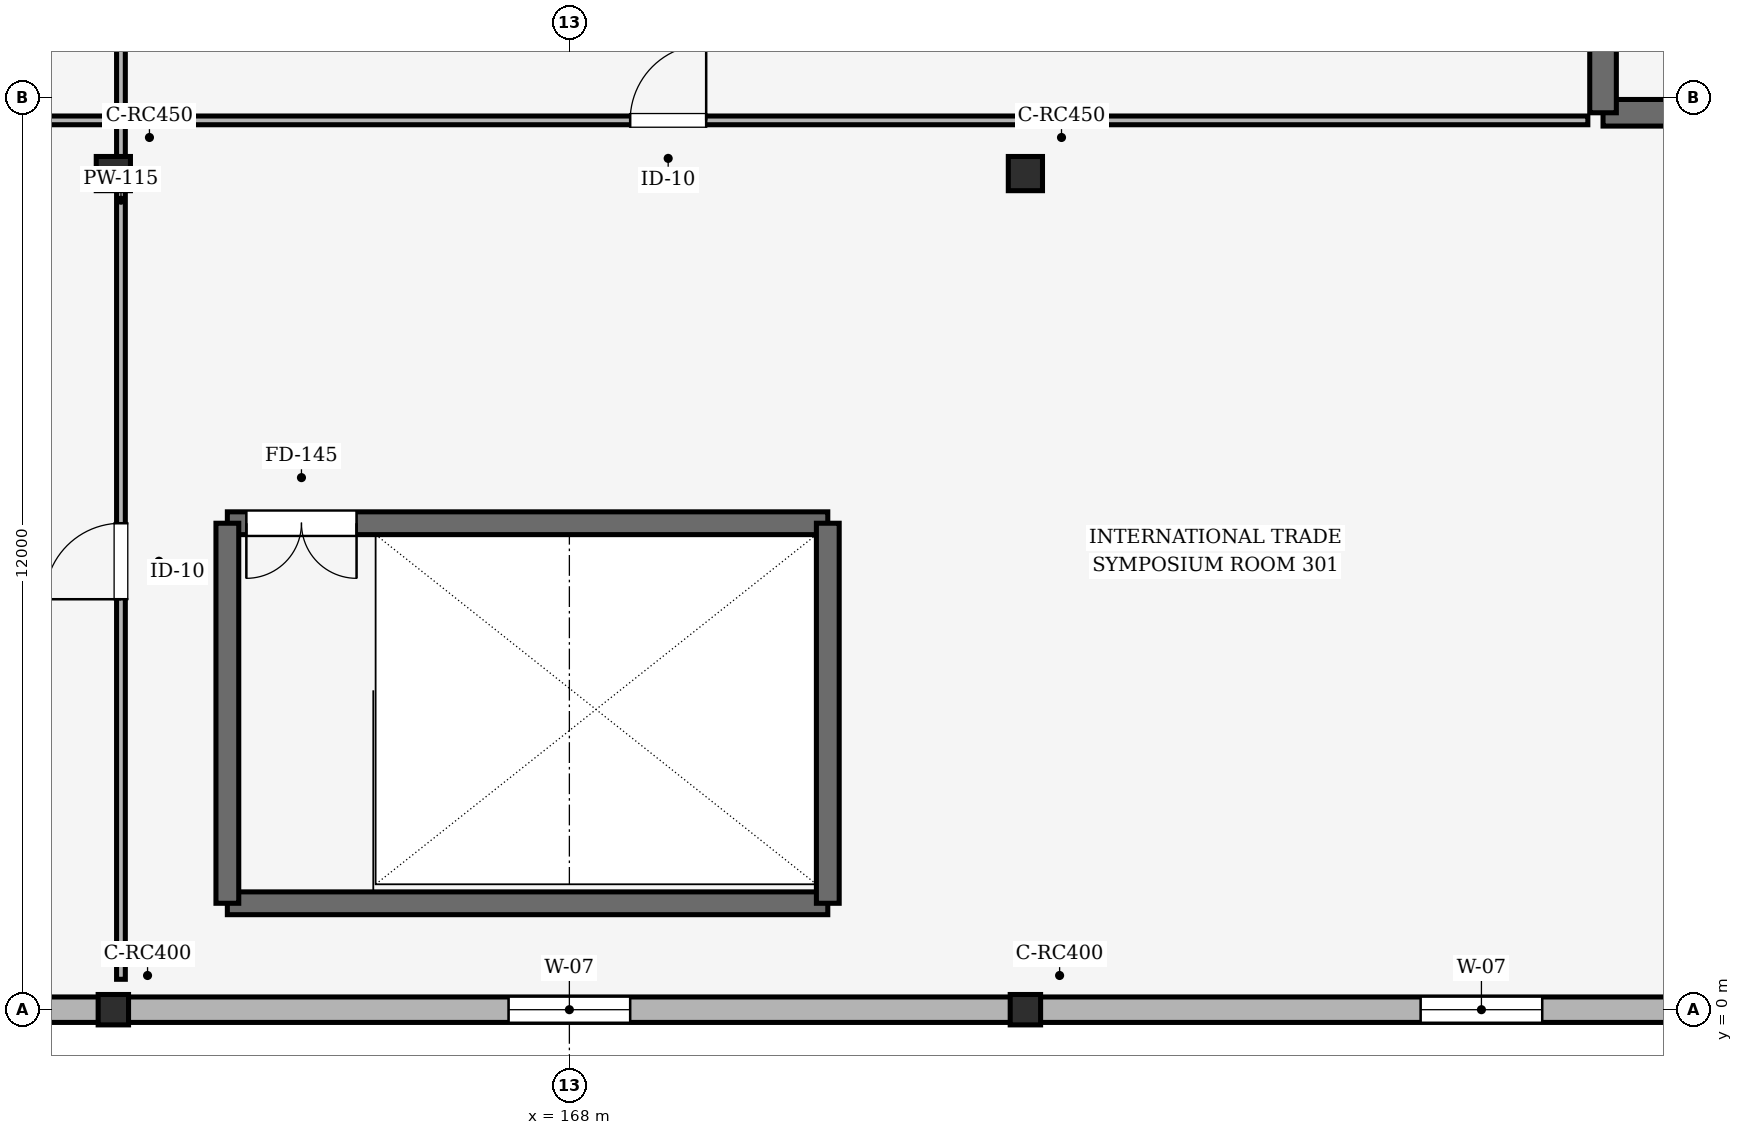
"""IFC4 building model, lengths in metres.
Left out: names, types, materials, properties, quantities, classifications, styles, units other than length and angle.
Written with IfcOpenShell. Run it as: python <this file> out.ifc"""

import sys

from ifc_helpers import new_model, si_unit, direction, frame, frame_2d, origin, origin_2d, place, context, subcontext, project, spatial, rectangle, extrude, element, fill, save


model = new_model("IFC4")
c1 = context("Model", 3, precision=1e-05, world=origin(), true_north=direction((0.0, 1.0)))
c2 = subcontext(c1, "Body", "Model", "MODEL_VIEW")
j1 = project(units=[si_unit("LENGTHUNIT", "METRE"), si_unit("PLANEANGLEUNIT", "RADIAN")], contexts=[c1])
p1 = place(None, origin())
s1 = spatial("IfcSite", under=j1, at=p1, CompositionType="ELEMENT")
p2 = place(p1, origin())
s2 = spatial("IfcBuilding", under=s1, at=p2, CompositionType="ELEMENT")
p3 = place(p2, frame((0.0, 0.0, 16.2)))
s3 = spatial("IfcBuildingStorey", under=s2, at=p3, CompositionType="ELEMENT", Elevation=16.2)
p4 = place(p3, frame((162.0, 0.0, 0.0), z_axis=(0.0, 0.0, 1.0), x_axis=(1.0, 0.0, 0.0)))
e1 = element("IfcColumn", 1, at=p4, inside=s3, PredefinedType="COLUMN", context=c2, shape_type="SweptSolid", body=[
    extrude(rectangle(XDim=0.4, YDim=0.4, at=origin_2d()), origin(), (0.0, 0.0, 1.0), 4.5),
])
p5 = place(p3, frame((162.0, 11.0, 0.0), z_axis=(0.0, 0.0, 1.0), x_axis=(1.0, 0.0, 0.0)))
e2 = element("IfcColumn", 2, at=p5, inside=s3, PredefinedType="COLUMN", context=c2, shape_type="SweptSolid", body=[
    extrude(rectangle(XDim=0.45, YDim=0.45, at=origin_2d()), origin(), (0.0, 0.0, 1.0), 4.5),
])
p6 = place(p3, frame((174.0, 0.0, 0.0), z_axis=(0.0, 0.0, 1.0), x_axis=(1.0, 0.0, 0.0)))
e3 = element("IfcColumn", 3, at=p6, inside=s3, PredefinedType="COLUMN", context=c2, shape_type="SweptSolid", body=[
    extrude(rectangle(XDim=0.4, YDim=0.4, at=origin_2d()), origin(), (0.0, 0.0, 1.0), 4.5),
])
p7 = place(p3, frame((174.0, 11.0, 0.0), z_axis=(0.0, 0.0, 1.0), x_axis=(1.0, 0.0, 0.0)))
e4 = element("IfcColumn", 4, at=p7, inside=s3, PredefinedType="COLUMN", context=c2, shape_type="SweptSolid", body=[
    extrude(rectangle(XDim=0.45, YDim=0.45, at=origin_2d()), origin(), (0.0, 0.0, 1.0), 4.5),
])
p8 = place(p3, frame((150.0, 0.0, 0.0), z_axis=(0.0, 0.0, 1.0), x_axis=(1.0, 0.0, 0.0)))
e5 = element("IfcWall", 5, at=p8, inside=s3, PredefinedType="SOLIDWALL", context=c2, shape_type="SweptSolid", body=[
    extrude(rectangle(XDim=12.0, YDim=0.335, at=frame_2d((6.0, 0.0))), origin(), (0.0, 0.0, 1.0), 3.5),
])
p9 = place(p8, frame((5.2, 0.0, 0.85)))
e6 = element("IfcOpeningElement", 6, at=p9, cuts=e5, PredefinedType="OPENING", context=c2, shape_type="SweptSolid", body=[
    extrude(rectangle(XDim=1.6, YDim=2.35, at=frame_2d((0.8, 1.175))), frame((0.0, 0.177, 0.0), z_axis=(0.0, -1.0, 0.0), x_axis=(1.0, 0.0, 0.0)), (0.0, 0.0, 1.0), 0.355),
])
p10 = place(p3, frame((162.0, 0.0, 0.0), z_axis=(0.0, 0.0, 1.0), x_axis=(1.0, 0.0, 0.0)))
e7 = element("IfcWall", 7, at=p10, inside=s3, PredefinedType="SOLIDWALL", context=c2, shape_type="SweptSolid", body=[
    extrude(rectangle(XDim=12.0, YDim=0.335, at=frame_2d((6.0, 0.0))), origin(), (0.0, 0.0, 1.0), 3.5),
])
p11 = place(p10, frame((5.2, 0.0, 0.85)))
e8 = element("IfcOpeningElement", 8, at=p11, cuts=e7, PredefinedType="OPENING", context=c2, shape_type="SweptSolid", body=[
    extrude(rectangle(XDim=1.6, YDim=2.35, at=frame_2d((0.8, 1.175))), frame((0.0, 0.177, 0.0), z_axis=(0.0, -1.0, 0.0), x_axis=(1.0, 0.0, 0.0)), (0.0, 0.0, 1.0), 0.355),
])
p12 = place(p3, frame((174.0, 0.0, 0.0), z_axis=(0.0, 0.0, 1.0), x_axis=(1.0, 0.0, 0.0)))
e9 = element("IfcWall", 9, at=p12, inside=s3, PredefinedType="SOLIDWALL", context=c2, shape_type="SweptSolid", body=[
    extrude(rectangle(XDim=12.0, YDim=0.335, at=frame_2d((6.0, 0.0))), origin(), (0.0, 0.0, 1.0), 3.5),
])
p13 = place(p12, frame((5.2, 0.0, 0.85)))
e10 = element("IfcOpeningElement", 10, at=p13, cuts=e9, PredefinedType="OPENING", context=c2, shape_type="SweptSolid", body=[
    extrude(rectangle(XDim=1.6, YDim=2.35, at=frame_2d((0.8, 1.175))), frame((0.0, 0.177, 0.0), z_axis=(0.0, -1.0, 0.0), x_axis=(1.0, 0.0, 0.0)), (0.0, 0.0, 1.0), 0.355),
])
p14 = place(p3, frame((181.6, 11.8, 0.0), z_axis=(0.0, 0.0, 1.0), x_axis=(1.0, 0.0, 0.0)))
e11 = element("IfcWall", 11, at=p14, inside=s3, PredefinedType="SHEAR", context=c2, shape_type="SweptSolid", body=[
    extrude(rectangle(XDim=10.2, YDim=0.35, at=frame_2d((5.1, 0.0))), origin(), (0.0, 0.0, 1.0), 4.5),
])
p15 = place(p3, frame((181.6, 20.2, 0.0), z_axis=(0.0, 0.0, 1.0), x_axis=(0.0, -1.0, 0.0)))
e12 = element("IfcWall", 12, at=p15, inside=s3, PredefinedType="SHEAR", context=c2, shape_type="SweptSolid", body=[
    extrude(rectangle(XDim=8.4, YDim=0.35, at=frame_2d((4.2, 0.0))), origin(), (0.0, 0.0, 1.0), 4.5),
])
p16 = place(p15, frame((2.95, 0.0, 0.0)))
e13 = element("IfcOpeningElement", 13, at=p16, cuts=e12, PredefinedType="OPENING", context=c2, shape_type="SweptSolid", body=[
    extrude(rectangle(XDim=1.15, YDim=2.15, at=frame_2d((0.575, 1.075))), frame((0.0, 0.185, 0.0), z_axis=(0.0, -1.0, 0.0), x_axis=(1.0, 0.0, 0.0)), (0.0, 0.0, 1.0), 0.37),
])
p17 = place(p3, frame((163.5, 1.4, 0.0), z_axis=(0.0, 0.0, 1.0), x_axis=(1.0, 0.0, 0.0)))
e14 = element("IfcWall", 14, at=p17, inside=s3, PredefinedType="SHEAR", context=c2, shape_type="SweptSolid", body=[
    extrude(rectangle(XDim=7.9, YDim=0.3, at=frame_2d((3.95, 0.0))), origin(), (0.0, 0.0, 1.0), 4.5),
])
p18 = place(p3, frame((171.4, 6.4, 0.0), z_axis=(0.0, 0.0, 1.0), x_axis=(-1.0, 0.0, 0.0)))
e15 = element("IfcWall", 15, at=p18, inside=s3, PredefinedType="SHEAR", context=c2, shape_type="SweptSolid", body=[
    extrude(rectangle(XDim=7.9, YDim=0.3, at=frame_2d((3.95, 0.0))), origin(), (0.0, 0.0, 1.0), 4.5),
])
p19 = place(p18, frame((6.2, 0.0, 0.0)))
e16 = element("IfcOpeningElement", 16, at=p19, cuts=e15, PredefinedType="OPENING", context=c2, shape_type="SweptSolid", body=[
    extrude(rectangle(XDim=1.45, YDim=2.15, at=frame_2d((0.725, 1.075))), frame((0.0, 0.16, 0.0), z_axis=(0.0, -1.0, 0.0), x_axis=(1.0, 0.0, 0.0)), (0.0, 0.0, 1.0), 0.32),
])
for number, where, z_axis, x_axis in (
    (17, (163.5, 6.4, 0.0), (0.0, 0.0, 1.0), (0.0, -1.0, 0.0)),
    (18, (171.4, 1.4, 0.0), (0.0, 0.0, 1.0), (0.0, 1.0, 0.0)),
):
    element("IfcWall", number, at=place(p3, frame(where, z_axis=z_axis, x_axis=x_axis)), inside=s3, PredefinedType="SHEAR", context=c2, shape_type="SweptSolid", body=[
        extrude(rectangle(XDim=5.0, YDim=0.3, at=frame_2d((2.5, 0.0))), origin(), (0.0, 0.0, 1.0), 4.5),
    ])
p20 = place(p3, frame((162.1, 0.4, 0.0), z_axis=(0.0, 0.0, 1.0), x_axis=(0.0, 1.0, 0.0)))
e19 = element("IfcWall", 19, at=p20, inside=s3, PredefinedType="PARTITIONING", context=c2, shape_type="SweptSolid", body=[
    extrude(rectangle(XDim=19.8, YDim=0.115, at=frame_2d((9.9, 0.0))), origin(), (0.0, 0.0, 1.0), 3.565),
])
p21 = place(p20, frame((5.0, 0.0, 0.0)))
e20 = element("IfcOpeningElement", 20, at=p21, cuts=e19, PredefinedType="OPENING", context=c2, shape_type="SweptSolid", body=[
    extrude(rectangle(XDim=1.0, YDim=2.15, at=frame_2d((0.5, 1.075))), frame((0.0, 0.067, 0.0), z_axis=(0.0, -1.0, 0.0), x_axis=(1.0, 0.0, 0.0)), (0.0, 0.0, 1.0), 0.135),
])
p22 = place(p20, frame((14.5, 0.0, 0.0)))
e21 = element("IfcOpeningElement", 21, at=p22, cuts=e19, PredefinedType="OPENING", context=c2, shape_type="SweptSolid", body=[
    extrude(rectangle(XDim=1.0, YDim=2.15, at=frame_2d((0.5, 1.075))), frame((0.0, 0.067, 0.0), z_axis=(0.0, -1.0, 0.0), x_axis=(1.0, 0.0, 0.0)), (0.0, 0.0, 1.0), 0.135),
])
p23 = place(p3, frame((137.8, 11.7, 0.0), z_axis=(0.0, 0.0, 1.0), x_axis=(1.0, 0.0, 0.0)))
e22 = element("IfcWall", 22, at=p23, inside=s3, PredefinedType="PARTITIONING", context=c2, shape_type="SweptSolid", body=[
    extrude(rectangle(XDim=43.6, YDim=0.115, at=frame_2d((21.8, 0.0))), origin(), (0.0, 0.0, 1.0), 3.565),
])
p24 = place(p23, frame((10.0, 0.0, 0.0)))
e23 = element("IfcOpeningElement", 23, at=p24, cuts=e22, PredefinedType="OPENING", context=c2, shape_type="SweptSolid", body=[
    extrude(rectangle(XDim=1.0, YDim=2.15, at=frame_2d((0.5, 1.075))), frame((0.0, 0.067, 0.0), z_axis=(0.0, -1.0, 0.0), x_axis=(1.0, 0.0, 0.0)), (0.0, 0.0, 1.0), 0.135),
])
p25 = place(p23, frame((31.0, 0.0, 0.0)))
e24 = element("IfcOpeningElement", 24, at=p25, cuts=e22, PredefinedType="OPENING", context=c2, shape_type="SweptSolid", body=[
    extrude(rectangle(XDim=1.0, YDim=2.15, at=frame_2d((0.5, 1.075))), frame((0.0, 0.067, 0.0), z_axis=(0.0, -1.0, 0.0), x_axis=(1.0, 0.0, 0.0)), (0.0, 0.0, 1.0), 0.135),
])
p26 = place(p11, origin())
e25 = element("IfcWindow", 25, at=p26, inside=s3, PartitioningType="DOUBLE_PANEL_VERTICAL", PredefinedType="WINDOW", context=c2, shape_type="SweptSolid", body=[
    extrude(rectangle(XDim=1.6, YDim=2.35, at=frame_2d((0.8, 1.175))), frame((0.0, 0.03, 0.0), z_axis=(0.0, -1.0, 0.0), x_axis=(1.0, 0.0, 0.0)), (0.0, 0.0, 1.0), 0.06),
])
fill(e8, e25)
p27 = place(p13, origin())
e26 = element("IfcWindow", 26, at=p27, inside=s3, PartitioningType="DOUBLE_PANEL_VERTICAL", PredefinedType="WINDOW", context=c2, shape_type="SweptSolid", body=[
    extrude(rectangle(XDim=1.6, YDim=2.35, at=frame_2d((0.8, 1.175))), frame((0.0, 0.03, 0.0), z_axis=(0.0, -1.0, 0.0), x_axis=(1.0, 0.0, 0.0)), (0.0, 0.0, 1.0), 0.06),
])
fill(e10, e26)
p28 = place(p19, origin())
e27 = element("IfcDoor", 27, at=p28, inside=s3, OperationType="DOUBLE_DOOR_SINGLE_SWING", PredefinedType="DOOR", context=c2, shape_type="SweptSolid", body=[
    extrude(rectangle(XDim=1.45, YDim=2.15, at=frame_2d((0.725, 1.075))), frame((0.0, 0.025, 0.0), z_axis=(0.0, -1.0, 0.0), x_axis=(1.0, 0.0, 0.0)), (0.0, 0.0, 1.0), 0.05),
])
fill(e16, e27)
p29 = place(p21, origin())
e28 = element("IfcDoor", 28, at=p29, inside=s3, OperationType="SINGLE_SWING_LEFT", PredefinedType="DOOR", context=c2, shape_type="SweptSolid", body=[
    extrude(rectangle(XDim=1.0, YDim=2.15, at=frame_2d((0.5, 1.075))), frame((0.0, 0.025, 0.0), z_axis=(0.0, -1.0, 0.0), x_axis=(1.0, 0.0, 0.0)), (0.0, 0.0, 1.0), 0.05),
])
fill(e20, e28)
p30 = place(p25, origin())
e29 = element("IfcDoor", 29, at=p30, inside=s3, OperationType="SINGLE_SWING_RIGHT", PredefinedType="DOOR", context=c2, shape_type="SweptSolid", body=[
    extrude(rectangle(XDim=1.0, YDim=2.15, at=frame_2d((0.5, 1.075))), frame((0.0, 0.025, 0.0), z_axis=(0.0, -1.0, 0.0), x_axis=(1.0, 0.0, 0.0)), (0.0, 0.0, 1.0), 0.05),
])
fill(e24, e29)
save(model, sys.argv[1])
